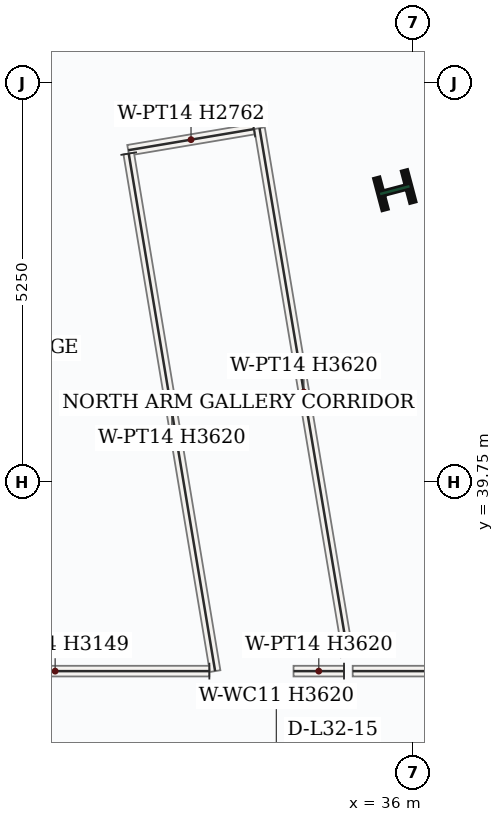
"""IFC4 building model, lengths in metres.
Left out: names, types, materials, properties, quantities, classifications, styles, units other than length and angle.
Written with IfcOpenShell. Run it as: python <this file> out.ifc"""

import sys

from ifc_helpers import new_model, si_unit, direction, frame, frame_2d, origin, origin_2d, place, context, subcontext, project, spatial, rectangle, i_section, extrude, source, transform, mapped, element, save


model = new_model("IFC4")
c1 = context("Model", 3, precision=1e-05, world=origin(), true_north=direction((0.0, 1.0)))
c2 = subcontext(c1, "Body", "Model", "MODEL_VIEW")
j1 = project(units=[si_unit("LENGTHUNIT", "METRE"), si_unit("PLANEANGLEUNIT", "RADIAN")], contexts=[c1])
p1 = place(None, origin())
s1 = spatial("IfcSite", under=j1, at=p1, CompositionType="ELEMENT")
p2 = place(p1, origin())
s2 = spatial("IfcBuilding", under=s1, at=p2, CompositionType="ELEMENT")
p3 = place(p2, frame((0.0, 0.0, 143.4)))
s3 = spatial("IfcBuildingStorey", under=s2, at=p3, CompositionType="ELEMENT", Elevation=143.4)
m1 = source(origin(), c2, "Body", "SweptSolid", [
    extrude(i_section(OverallWidth=0.412, OverallDepth=0.435, WebThickness=0.036, FlangeThickness=0.057, FilletRadius=0.018, at=origin_2d()), origin(), (0.0, 0.0, 1.0), 3.9),
])
p4 = place(p3, frame((35.755, 43.588, 0.0), z_axis=(0.0, 0.0, 1.0), x_axis=(-0.255445757936, 0.966823388604, 0.0)))
e1 = element("IfcColumn", 1, at=p4, inside=s3, PredefinedType="COLUMN", context=c2, shape_type="MappedRepresentation", body=[
    mapped(m1, transform((0.0, 0.0, 0.0), x_axis=(1.0, 0.0, 0.0), y_axis=(0.0, 1.0, 0.0), z_axis=(0.0, 0.0, 1.0), scale=1.0)),
])
p5 = place(p3, frame((42.742, 37.26, 0.0), z_axis=(0.0, 0.0, 1.0), x_axis=(-0.999999999476, 3.2371888e-05, 0.0)))
e2 = element("IfcWall", 2, at=p5, inside=s3, PredefinedType="PARTITIONING", context=c2, shape_type="SweptSolid", body=[
    extrude(rectangle(XDim=7.542, YDim=0.14, at=frame_2d((3.771, 0.0))), origin(), (0.0, 0.0, 1.0), 3.62),
])
p6 = place(p5, frame((5.142, 0.0, 0.0)))
e3 = element("IfcOpeningElement", 3, at=p6, cuts=e2, PredefinedType="OPENING", context=c2, shape_type="SweptSolid", body=[
    extrude(rectangle(XDim=0.95, YDim=2.15, at=frame_2d((0.475, 1.075))), frame((0.0, 0.08, 0.0), z_axis=(0.0, -1.0, 0.0), x_axis=(1.0, 0.0, 0.0)), (0.0, 0.0, 1.0), 0.16),
])
m2 = source(origin(), c2, "Body", "SweptSolid", [
    extrude(rectangle(XDim=0.664, YDim=0.14, at=frame_2d((0.332, 0.0))), origin(), (0.0, 0.0, 1.0), 3.62),
])
p7 = place(p3, frame((35.086, 37.26, 0.0), z_axis=(0.0, 0.0, 1.0), x_axis=(-1.0, 0.0, 0.0)))
e4 = element("IfcWall", 4, at=p7, inside=s3, PredefinedType="PARTITIONING", context=c2, shape_type="MappedRepresentation", body=[
    mapped(m2, transform((0.0, 0.0, 0.0), x_axis=(1.0, 0.0, 0.0), y_axis=(0.0, 1.0, 0.0), z_axis=(0.0, 0.0, 1.0), scale=1.0)),
])
m3 = source(origin(), c2, "Body", "SweptSolid", [
    extrude(rectangle(XDim=7.041, YDim=0.14, at=frame_2d((3.521, 0.0))), origin(), (0.0, 0.0, 1.0), 3.62),
])
p8 = place(p3, frame((35.142, 37.459, 0.0), z_axis=(0.0, 0.0, 1.0), x_axis=(-0.165703306215, 0.98617565084, 0.0)))
e5 = element("IfcWall", 5, at=p8, inside=s3, PredefinedType="PARTITIONING", context=c2, shape_type="MappedRepresentation", body=[
    mapped(m3, transform((0.0, 0.0, 0.0), x_axis=(1.0, 0.0, 0.0), y_axis=(0.0, 1.0, 0.0), z_axis=(0.0, 0.0, 1.0), scale=1.0)),
])
m4 = source(origin(), c2, "Body", "SweptSolid", [
    extrude(rectangle(XDim=1.677, YDim=0.14, at=frame_2d((0.839, 0.0))), origin(), (0.0, 0.0, 1.0), 2.762),
])
p9 = place(p3, frame((33.901, 44.391, 0.0), z_axis=(0.0, 0.0, 1.0), x_axis=(-0.986164833546, -0.165767671991, 0.0)))
e6 = element("IfcWall", 6, at=p9, inside=s3, PredefinedType="PARTITIONING", context=c2, shape_type="MappedRepresentation", body=[
    mapped(m4, transform((0.0, 0.0, 0.0), x_axis=(1.0, 0.0, 0.0), y_axis=(0.0, 1.0, 0.0), z_axis=(0.0, 0.0, 1.0), scale=1.0)),
])
m5 = source(origin(), c2, "Body", "SweptSolid", [
    extrude(rectangle(XDim=6.903, YDim=0.14, at=frame_2d((3.451, 0.0))), origin(), (0.0, 0.0, 1.0), 3.62),
])
p10 = place(p3, frame((32.254, 44.069, 0.0), z_axis=(0.0, 0.0, 1.0), x_axis=(0.164708688009, -0.986342257076, 0.0)))
e7 = element("IfcWall", 7, at=p10, inside=s3, PredefinedType="PARTITIONING", context=c2, shape_type="MappedRepresentation", body=[
    mapped(m5, transform((0.0, 0.0, 0.0), x_axis=(1.0, 0.0, 0.0), y_axis=(0.0, 1.0, 0.0), z_axis=(0.0, 0.0, 1.0), scale=1.0)),
])
m6 = source(origin(), c2, "Body", "SweptSolid", [
    extrude(rectangle(XDim=4.057, YDim=0.14, at=frame_2d((2.029, 0.0))), origin(), (0.0, 0.0, 1.0), 3.149),
])
p11 = place(p3, frame((33.315, 37.26, 0.0), z_axis=(0.0, 0.0, 1.0), x_axis=(-0.999999998189, -6.0175713e-05, 0.0)))
e8 = element("IfcWall", 8, at=p11, inside=s3, PredefinedType="PARTITIONING", context=c2, shape_type="MappedRepresentation", body=[
    mapped(m6, transform((0.0, 0.0, 0.0), x_axis=(1.0, 0.0, 0.0), y_axis=(0.0, 1.0, 0.0), z_axis=(0.0, 0.0, 1.0), scale=1.0)),
])
save(model, sys.argv[1])
